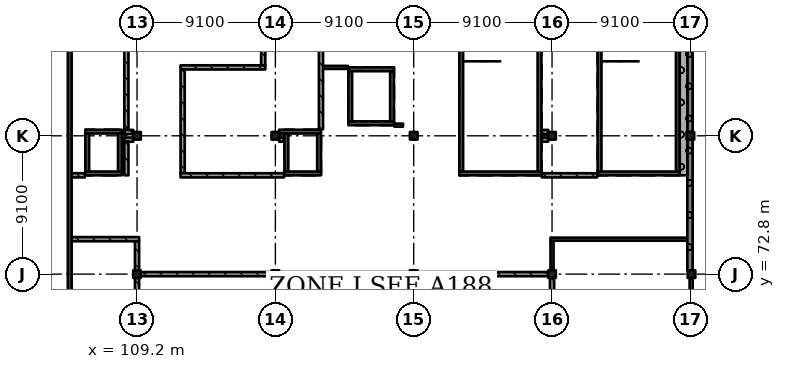
"""IFC4 building model, lengths in metres.
Left out: names, types, materials, properties, quantities, classifications, styles, units other than length and angle.
Written with IfcOpenShell. Run it as: python <this file> out.ifc"""

import sys

from ifc_helpers import new_model, si_unit, direction, frame, frame_2d, origin, origin_2d, place, context, subcontext, project, spatial, rectangle, extrude, element, fill, save


model = new_model("IFC4")
c1 = context("Model", 3, precision=1e-05, world=origin(), true_north=direction((0.0, 1.0)))
c2 = subcontext(c1, "Body", "Model", "MODEL_VIEW")
j1 = project(units=[si_unit("LENGTHUNIT", "METRE"), si_unit("PLANEANGLEUNIT", "RADIAN")], contexts=[c1])
p1 = place(None, origin())
s1 = spatial("IfcSite", under=j1, at=p1, CompositionType="ELEMENT")
p2 = place(p1, origin())
s2 = spatial("IfcBuilding", under=s1, at=p2, CompositionType="ELEMENT")
p3 = place(p2, frame((0.0, 0.0, 29.12)))
s3 = spatial("IfcBuildingStorey", under=s2, at=p3, CompositionType="ELEMENT", Elevation=29.12)
for number, where, z_axis, x_axis in (
    (1, (109.2, 72.8, 0.0), (0.0, 0.0, 1.0), (1.0, 0.0, 0.0)),
    (2, (109.2, 81.9, 0.0), (0.0, 0.0, 1.0), (1.0, 0.0, 0.0)),
    (3, (118.3, 72.8, 0.0), (0.0, 0.0, 1.0), (1.0, 0.0, 0.0)),
    (4, (118.3, 81.9, 0.0), (0.0, 0.0, 1.0), (1.0, 0.0, 0.0)),
    (5, (127.4, 72.8, 0.0), (0.0, 0.0, 1.0), (1.0, 0.0, 0.0)),
    (6, (127.4, 81.9, 0.0), (0.0, 0.0, 1.0), (1.0, 0.0, 0.0)),
    (7, (136.5, 72.8, 0.0), (0.0, 0.0, 1.0), (1.0, 0.0, 0.0)),
    (8, (136.5, 81.9, 0.0), (0.0, 0.0, 1.0), (1.0, 0.0, 0.0)),
    (9, (145.675, 72.8, 0.0), (0.0, 0.0, 1.0), (1.0, 0.0, 0.0)),
    (10, (145.6, 81.9, 0.0), (0.0, 0.0, 1.0), (1.0, 0.0, 0.0)),
):
    element("IfcColumn", number, at=place(p3, frame(where, z_axis=z_axis, x_axis=x_axis)), inside=s3, PredefinedType="COLUMN", context=c2, shape_type="SweptSolid", body=[
        extrude(rectangle(XDim=0.5, YDim=0.5, at=origin_2d()), origin(), (0.0, 0.0, 1.0), 4.55),
    ])
p4 = place(p3, frame((104.775, 68.25, 0.0), z_axis=(0.0, 0.0, 1.0), x_axis=(0.0, 1.0, 0.0)))
e11 = element("IfcWall", 11, at=p4, inside=s3, PredefinedType="SHEAR", context=c2, shape_type="SweptSolid", body=[
    extrude(rectangle(XDim=40.775, YDim=0.25, at=frame_2d((20.387, 0.0))), origin(), (0.0, 0.0, 1.0), 4.55),
])
p5 = place(p3, frame((108.2, 79.425, 0.0), z_axis=(0.0, 0.0, 1.0), x_axis=(-1.0, 0.0, 0.0)))
e12 = element("IfcWall", 12, at=p5, inside=s3, PredefinedType="SHEAR", context=c2, shape_type="SweptSolid", body=[
    extrude(rectangle(XDim=2.4, YDim=0.25, at=frame_2d((1.2, 0.0))), origin(), (0.0, 0.0, 1.0), 4.55),
])
p6 = place(p5, frame((0.75, 0.0, 0.0)))
e13 = element("IfcOpeningElement", 13, at=p6, cuts=e12, PredefinedType="OPENING", context=c2, shape_type="SweptSolid", body=[
    extrude(rectangle(XDim=0.9, YDim=2.1, at=frame_2d((0.45, 1.05))), frame((0.0, 0.135, 0.0), z_axis=(0.0, -1.0, 0.0), x_axis=(1.0, 0.0, 0.0)), (0.0, 0.0, 1.0), 0.27),
])
p7 = place(p3, frame((108.2, 82.175, 0.0), z_axis=(0.0, 0.0, 1.0), x_axis=(-1.0, 0.0, 0.0)))
e14 = element("IfcWall", 14, at=p7, inside=s3, PredefinedType="SHEAR", context=c2, shape_type="SweptSolid", body=[
    extrude(rectangle(XDim=2.4, YDim=0.25, at=frame_2d((1.2, 0.0))), origin(), (0.0, 0.0, 1.0), 4.55),
])
for number, where, z_axis, x_axis in (
    (15, (105.925, 82.05, 0.0), (0.0, 0.0, 1.0), (0.0, -1.0, 0.0)),
    (16, (108.075, 82.05, 0.0), (0.0, 0.0, 1.0), (0.0, -1.0, 0.0)),
):
    element("IfcWall", number, at=place(p3, frame(where, z_axis=z_axis, x_axis=x_axis)), inside=s3, PredefinedType="SHEAR", context=c2, shape_type="SweptSolid", body=[
        extrude(rectangle(XDim=2.5, YDim=0.25, at=frame_2d((1.25, 0.0))), origin(), (0.0, 0.0, 1.0), 4.55),
    ])
p8 = place(p3, frame((121.3, 79.425, 0.0), z_axis=(0.0, 0.0, 1.0), x_axis=(-1.0, 0.0, 0.0)))
e17 = element("IfcWall", 17, at=p8, inside=s3, PredefinedType="SHEAR", context=c2, shape_type="SweptSolid", body=[
    extrude(rectangle(XDim=2.4, YDim=0.25, at=frame_2d((1.2, 0.0))), origin(), (0.0, 0.0, 1.0), 4.55),
])
p9 = place(p3, frame((121.3, 82.175, 0.0), z_axis=(0.0, 0.0, 1.0), x_axis=(-1.0, 0.0, 0.0)))
e18 = element("IfcWall", 18, at=p9, inside=s3, PredefinedType="SHEAR", context=c2, shape_type="SweptSolid", body=[
    extrude(rectangle(XDim=2.75, YDim=0.25, at=frame_2d((1.375, 0.0))), origin(), (0.0, 0.0, 1.0), 4.55),
])
p10 = place(p3, frame((119.025, 82.05, 0.0), z_axis=(0.0, 0.0, 1.0), x_axis=(0.0, -1.0, 0.0)))
e19 = element("IfcWall", 19, at=p10, inside=s3, PredefinedType="SHEAR", context=c2, shape_type="SweptSolid", body=[
    extrude(rectangle(XDim=2.5, YDim=0.25, at=frame_2d((1.25, 0.0))), origin(), (0.0, 0.0, 1.0), 4.55),
])
p11 = place(p3, frame((121.175, 82.05, 0.0), z_axis=(0.0, 0.0, 1.0), x_axis=(0.0, -1.0, 0.0)))
e20 = element("IfcWall", 20, at=p11, inside=s3, PredefinedType="SHEAR", context=c2, shape_type="SweptSolid", body=[
    extrude(rectangle(XDim=2.5, YDim=0.25, at=frame_2d((1.25, 0.0))), origin(), (0.0, 0.0, 1.0), 4.55),
])
p12 = place(p11, frame((0.9, 0.0, 0.0)))
e21 = element("IfcOpeningElement", 21, at=p12, cuts=e20, PredefinedType="OPENING", context=c2, shape_type="SweptSolid", body=[
    extrude(rectangle(XDim=0.7, YDim=2.1, at=frame_2d((0.35, 1.05))), frame((0.0, 0.135, 0.0), z_axis=(0.0, -1.0, 0.0), x_axis=(1.0, 0.0, 0.0)), (0.0, 0.0, 1.0), 0.27),
])
p13 = place(p3, frame((126.1, 82.725, 0.0), z_axis=(0.0, 0.0, 1.0), x_axis=(-1.0, 0.0, 0.0)))
e22 = element("IfcWall", 22, at=p13, inside=s3, PredefinedType="SHEAR", context=c2, shape_type="SweptSolid", body=[
    extrude(rectangle(XDim=3.0, YDim=0.25, at=frame_2d((1.5, 0.0))), origin(), (0.0, 0.0, 1.0), 4.55),
])
p14 = place(p3, frame((126.1, 86.275, 0.0), z_axis=(0.0, 0.0, 1.0), x_axis=(-1.0, 0.0, 0.0)))
e23 = element("IfcWall", 23, at=p14, inside=s3, PredefinedType="SHEAR", context=c2, shape_type="SweptSolid", body=[
    extrude(rectangle(XDim=3.0, YDim=0.25, at=frame_2d((1.5, 0.0))), origin(), (0.0, 0.0, 1.0), 4.55),
])
p15 = place(p14, frame((0.95, 0.0, 0.0)))
e24 = element("IfcOpeningElement", 24, at=p15, cuts=e23, PredefinedType="OPENING", context=c2, shape_type="SweptSolid", body=[
    extrude(rectangle(XDim=1.1, YDim=2.1, at=frame_2d((0.55, 1.05))), frame((0.0, 0.135, 0.0), z_axis=(0.0, -1.0, 0.0), x_axis=(1.0, 0.0, 0.0)), (0.0, 0.0, 1.0), 0.27),
])
for number, where, z_axis, x_axis in (
    (25, (123.225, 86.15, 0.0), (0.0, 0.0, 1.0), (0.0, -1.0, 0.0)),
    (26, (125.975, 86.15, 0.0), (0.0, 0.0, 1.0), (0.0, -1.0, 0.0)),
):
    element("IfcWall", number, at=place(p3, frame(where, z_axis=z_axis, x_axis=x_axis)), inside=s3, PredefinedType="SHEAR", context=c2, shape_type="SweptSolid", body=[
        extrude(rectangle(XDim=3.3, YDim=0.25, at=frame_2d((1.65, 0.0))), origin(), (0.0, 0.0, 1.0), 4.55),
    ])
p16 = place(p3, frame((144.9, 79.425, 0.0), z_axis=(0.0, 0.0, 1.0), x_axis=(-1.0, 0.0, 0.0)))
e27 = element("IfcWall", 27, at=p16, inside=s3, PredefinedType="SHEAR", context=c2, shape_type="SweptSolid", body=[
    extrude(rectangle(XDim=5.4, YDim=0.25, at=frame_2d((2.7, 0.0))), origin(), (0.0, 0.0, 1.0), 4.55),
])
for number, where, z_axis, x_axis in (
    (28, (139.625, 89.15, 0.0), (0.0, 0.0, 1.0), (0.0, -1.0, 0.0)),
    (29, (144.775, 89.15, 0.0), (0.0, 0.0, 1.0), (0.0, -1.0, 0.0)),
):
    element("IfcWall", number, at=place(p3, frame(where, z_axis=z_axis, x_axis=x_axis)), inside=s3, PredefinedType="SHEAR", context=c2, shape_type="SweptSolid", body=[
        extrude(rectangle(XDim=9.6, YDim=0.25, at=frame_2d((4.8, 0.0))), origin(), (0.0, 0.0, 1.0), 4.55),
    ])
p17 = place(p3, frame((135.8, 79.425, 0.0), z_axis=(0.0, 0.0, 1.0), x_axis=(-1.0, 0.0, 0.0)))
e30 = element("IfcWall", 30, at=p17, inside=s3, PredefinedType="SHEAR", context=c2, shape_type="SweptSolid", body=[
    extrude(rectangle(XDim=5.4, YDim=0.25, at=frame_2d((2.7, 0.0))), origin(), (0.0, 0.0, 1.0), 4.55),
])
for number, where, z_axis, x_axis in (
    (31, (130.525, 89.15, 0.0), (0.0, 0.0, 1.0), (0.0, -1.0, 0.0)),
    (32, (135.675, 89.15, 0.0), (0.0, 0.0, 1.0), (0.0, -1.0, 0.0)),
):
    element("IfcWall", number, at=place(p3, frame(where, z_axis=z_axis, x_axis=x_axis)), inside=s3, PredefinedType="SHEAR", context=c2, shape_type="SweptSolid", body=[
        extrude(rectangle(XDim=9.6, YDim=0.25, at=frame_2d((4.8, 0.0))), origin(), (0.0, 0.0, 1.0), 4.55),
    ])
p18 = place(p3, frame((145.65, 68.25, 0.0), z_axis=(0.0, 0.0, 1.0), x_axis=(0.0, 1.0, 0.0)))
e33 = element("IfcWall", 33, at=p18, inside=s3, PredefinedType="SOLIDWALL", context=c2, shape_type="SweptSolid", body=[
    extrude(rectangle(XDim=4.3, YDim=0.2, at=frame_2d((2.15, 0.0))), origin(), (0.0, 0.0, 1.0), 4.5),
])
p19 = place(p18, frame((0.65, 0.0, 0.6)))
e34 = element("IfcOpeningElement", 34, at=p19, cuts=e33, PredefinedType="OPENING", context=c2, shape_type="SweptSolid", body=[
    extrude(rectangle(XDim=3.0, YDim=3.0, at=frame_2d((1.5, 1.5))), frame((0.0, 0.11, 0.0), z_axis=(0.0, -1.0, 0.0), x_axis=(1.0, 0.0, 0.0)), (0.0, 0.0, 1.0), 0.22),
])
p20 = place(p3, frame((145.575, 73.05, 0.0), z_axis=(0.0, 0.0, 1.0), x_axis=(0.0, 1.0, 0.0)))
e35 = element("IfcWall", 35, at=p20, inside=s3, PredefinedType="SOLIDWALL", context=c2, shape_type="SweptSolid", body=[
    extrude(rectangle(XDim=8.6, YDim=0.35, at=frame_2d((4.3, 0.0))), origin(), (0.0, 0.0, 1.0), 4.5),
])
p21 = place(p3, frame((145.575, 82.15, 0.0), z_axis=(0.0, 0.0, 1.0), x_axis=(0.0, 1.0, 0.0)))
e36 = element("IfcWall", 36, at=p21, inside=s3, PredefinedType="SOLIDWALL", context=c2, shape_type="SweptSolid", body=[
    extrude(rectangle(XDim=8.6, YDim=0.35, at=frame_2d((4.3, 0.0))), origin(), (0.0, 0.0, 1.0), 4.5),
])
p22 = place(p3, frame((145.15, 79.3, 0.0), z_axis=(0.0, 0.0, 1.0), x_axis=(0.0, 1.0, 0.0)))
e37 = element("IfcWall", 37, at=p22, inside=s3, PredefinedType="SOLIDWALL", context=c2, shape_type="SweptSolid", body=[
    extrude(rectangle(XDim=10.1, YDim=0.5, at=frame_2d((5.05, 0.0))), origin(), (0.0, 0.0, 1.0), 4.55),
])
p23 = place(p3, frame((104.9, 75.1, 0.0), z_axis=(0.0, 0.0, 1.0), x_axis=(1.0, 0.0, 0.0)))
e38 = element("IfcWall", 38, at=p23, inside=s3, PredefinedType="SOLIDWALL", context=c2, shape_type="SweptSolid", body=[
    extrude(rectangle(XDim=4.438, YDim=0.275, at=frame_2d((2.219, 0.0))), origin(), (0.0, 0.0, 1.0), 3.88),
])
p24 = place(p23, frame((1.65, 0.0, 0.0)))
e39 = element("IfcOpeningElement", 39, at=p24, cuts=e38, PredefinedType="OPENING", context=c2, shape_type="SweptSolid", body=[
    extrude(rectangle(XDim=1.2, YDim=2.4, at=frame_2d((0.6, 1.2))), frame((0.0, 0.147, 0.0), z_axis=(0.0, -1.0, 0.0), x_axis=(1.0, 0.0, 0.0)), (0.0, 0.0, 1.0), 0.295),
])
p25 = place(p3, frame((105.77, 79.3, 0.0), z_axis=(0.0, 0.0, 1.0), x_axis=(-1.0, 0.0, 0.0)))
e40 = element("IfcWall", 40, at=p25, inside=s3, PredefinedType="SOLIDWALL", context=c2, shape_type="SweptSolid", body=[
    extrude(rectangle(XDim=0.87, YDim=0.275, at=frame_2d((0.435, 0.0))), origin(), (0.0, 0.0, 1.0), 3.88),
])
p26 = place(p3, frame((108.363, 81.65, 0.0), z_axis=(0.0, 0.0, 1.0), x_axis=(1.0, 0.0, 0.0)))
e41 = element("IfcWall", 41, at=p26, inside=s3, PredefinedType="SOLIDWALL", context=c2, shape_type="SweptSolid", body=[
    extrude(rectangle(XDim=0.587, YDim=0.275, at=frame_2d((0.294, 0.0))), origin(), (0.0, 0.0, 1.0), 3.88),
])
p27 = place(p3, frame((108.5, 79.3, 0.0), z_axis=(0.0, 0.0, 1.0), x_axis=(0.0, 1.0, 0.0)))
e42 = element("IfcWall", 42, at=p27, inside=s3, PredefinedType="SOLIDWALL", context=c2, shape_type="SweptSolid", body=[
    extrude(rectangle(XDim=2.212, YDim=0.275, at=frame_2d((1.106, 0.0))), origin(), (0.0, 0.0, 1.0), 3.88),
])
p28 = place(p3, frame((108.5, 82.288, 0.0), z_axis=(0.0, 0.0, 1.0), x_axis=(0.0, 1.0, 0.0)))
e43 = element("IfcWall", 43, at=p28, inside=s3, PredefinedType="SOLIDWALL", context=c2, shape_type="SweptSolid", body=[
    extrude(rectangle(XDim=6.975, YDim=0.275, at=frame_2d((3.487, 0.0))), origin(), (0.0, 0.0, 1.0), 3.88),
])
p29 = place(p3, frame((108.95, 82.15, 0.0), z_axis=(0.0, 0.0, 1.0), x_axis=(-1.0, 0.0, 0.0)))
e44 = element("IfcWall", 44, at=p29, inside=s3, PredefinedType="SOLIDWALL", context=c2, shape_type="SweptSolid", body=[
    extrude(rectangle(XDim=0.587, YDim=0.275, at=frame_2d((0.294, 0.0))), origin(), (0.0, 0.0, 1.0), 3.88),
])
p30 = place(p3, frame((109.2, 68.5, 0.0), z_axis=(0.0, 0.0, 1.0), x_axis=(0.0, 1.0, 0.0)))
e45 = element("IfcWall", 45, at=p30, inside=s3, PredefinedType="SOLIDWALL", context=c2, shape_type="SweptSolid", body=[
    extrude(rectangle(XDim=4.05, YDim=0.275, at=frame_2d((2.025, 0.0))), origin(), (0.0, 0.0, 1.0), 3.88),
])
p31 = place(p3, frame((109.2, 74.962, 0.0), z_axis=(0.0, 0.0, 1.0), x_axis=(0.0, -1.0, 0.0)))
e46 = element("IfcWall", 46, at=p31, inside=s3, PredefinedType="SOLIDWALL", context=c2, shape_type="SweptSolid", body=[
    extrude(rectangle(XDim=1.912, YDim=0.275, at=frame_2d((0.956, 0.0))), origin(), (0.0, 0.0, 1.0), 3.88),
])
p32 = place(p3, frame((109.45, 72.8, 0.0), z_axis=(0.0, 0.0, 1.0), x_axis=(1.0, 0.0, 0.0)))
e47 = element("IfcWall", 47, at=p32, inside=s3, PredefinedType="SOLIDWALL", context=c2, shape_type="SweptSolid", body=[
    extrude(rectangle(XDim=8.6, YDim=0.275, at=frame_2d((4.3, 0.0))), origin(), (0.0, 0.0, 1.0), 3.88),
])
p33 = place(p32, frame((3.65, 0.0, 0.0)))
e48 = element("IfcOpeningElement", 48, at=p33, cuts=e47, PredefinedType="OPENING", context=c2, shape_type="SweptSolid", body=[
    extrude(rectangle(XDim=1.2, YDim=2.4, at=frame_2d((0.6, 1.2))), frame((0.0, 0.147, 0.0), z_axis=(0.0, -1.0, 0.0), x_axis=(1.0, 0.0, 0.0)), (0.0, 0.0, 1.0), 0.295),
])
p34 = place(p3, frame((112.062, 86.4, 0.0), z_axis=(0.0, 0.0, 1.0), x_axis=(1.0, 0.0, 0.0)))
e49 = element("IfcWall", 49, at=p34, inside=s3, PredefinedType="SOLIDWALL", context=c2, shape_type="SweptSolid", body=[
    extrude(rectangle(XDim=5.575, YDim=0.275, at=frame_2d((2.788, 0.0))), origin(), (0.0, 0.0, 1.0), 3.88),
])
p35 = place(p3, frame((112.2, 79.438, 0.0), z_axis=(0.0, 0.0, 1.0), x_axis=(0.0, 1.0, 0.0)))
e50 = element("IfcWall", 50, at=p35, inside=s3, PredefinedType="SOLIDWALL", context=c2, shape_type="SweptSolid", body=[
    extrude(rectangle(XDim=6.825, YDim=0.275, at=frame_2d((3.413, 0.0))), origin(), (0.0, 0.0, 1.0), 3.88),
])
p36 = place(p3, frame((112.062, 79.3, 0.0), z_axis=(0.0, 0.0, 1.0), x_axis=(1.0, 0.0, 0.0)))
e51 = element("IfcWall", 51, at=p36, inside=s3, PredefinedType="SOLIDWALL", context=c2, shape_type="SweptSolid", body=[
    extrude(rectangle(XDim=6.808, YDim=0.275, at=frame_2d((3.404, 0.0))), origin(), (0.0, 0.0, 1.0), 3.88),
])
p37 = place(p3, frame((117.5, 86.538, 0.0), z_axis=(0.0, 0.0, 1.0), x_axis=(0.0, 1.0, 0.0)))
e52 = element("IfcWall", 52, at=p37, inside=s3, PredefinedType="SOLIDWALL", context=c2, shape_type="SweptSolid", body=[
    extrude(rectangle(XDim=2.725, YDim=0.275, at=frame_2d((1.362, 0.0))), origin(), (0.0, 0.0, 1.0), 3.88),
])
p38 = place(p3, frame((118.55, 72.8, 0.0), z_axis=(0.0, 0.0, 1.0), x_axis=(1.0, 0.0, 0.0)))
e53 = element("IfcWall", 53, at=p38, inside=s3, PredefinedType="SOLIDWALL", context=c2, shape_type="SweptSolid", body=[
    extrude(rectangle(XDim=8.6, YDim=0.275, at=frame_2d((4.3, 0.0))), origin(), (0.0, 0.0, 1.0), 3.88),
])
p39 = place(p3, frame((118.55, 81.65, 0.0), z_axis=(0.0, 0.0, 1.0), x_axis=(1.0, 0.0, 0.0)))
e54 = element("IfcWall", 54, at=p39, inside=s3, PredefinedType="SOLIDWALL", context=c2, shape_type="SweptSolid", body=[
    extrude(rectangle(XDim=0.32, YDim=0.275, at=frame_2d((0.16, 0.0))), origin(), (0.0, 0.0, 1.0), 3.88),
])
p40 = place(p3, frame((121.3, 82.33, 0.0), z_axis=(0.0, 0.0, 1.0), x_axis=(0.0, 1.0, 0.0)))
e55 = element("IfcWall", 55, at=p40, inside=s3, PredefinedType="SOLIDWALL", context=c2, shape_type="SweptSolid", body=[
    extrude(rectangle(XDim=6.932, YDim=0.275, at=frame_2d((3.466, 0.0))), origin(), (0.0, 0.0, 1.0), 3.88),
])
p41 = place(p3, frame((122.85, 68.5, 0.0), z_axis=(0.0, 0.0, 1.0), x_axis=(0.0, 1.0, 0.0)))
e56 = element("IfcWall", 56, at=p41, inside=s3, PredefinedType="SOLIDWALL", context=c2, shape_type="SweptSolid", body=[
    extrude(rectangle(XDim=4.163, YDim=0.275, at=frame_2d((2.081, 0.0))), origin(), (0.0, 0.0, 1.0), 3.88),
])
p42 = place(p3, frame((123.07, 86.4, 0.0), z_axis=(0.0, 0.0, 1.0), x_axis=(-1.0, 0.0, 0.0)))
e57 = element("IfcWall", 57, at=p42, inside=s3, PredefinedType="PARTITIONING", context=c2, shape_type="SweptSolid", body=[
    extrude(rectangle(XDim=1.633, YDim=0.2, at=frame_2d((0.816, 0.0))), origin(), (0.0, 0.0, 1.0), 3.88),
])
p43 = place(p3, frame((126.7, 82.6, 0.0), z_axis=(0.0, 0.0, 1.0), x_axis=(-1.0, 0.0, 0.0)))
e58 = element("IfcWall", 58, at=p43, inside=s3, PredefinedType="PARTITIONING", context=c2, shape_type="SweptSolid", body=[
    extrude(rectangle(XDim=0.57, YDim=0.2, at=frame_2d((0.285, 0.0))), origin(), (0.0, 0.0, 1.0), 3.88),
])
p44 = place(p3, frame((127.65, 72.8, 0.0), z_axis=(0.0, 0.0, 1.0), x_axis=(1.0, 0.0, 0.0)))
e59 = element("IfcWall", 59, at=p44, inside=s3, PredefinedType="SOLIDWALL", context=c2, shape_type="SweptSolid", body=[
    extrude(rectangle(XDim=8.6, YDim=0.275, at=frame_2d((4.3, 0.0))), origin(), (0.0, 0.0, 1.0), 3.88),
])
p45 = place(p44, frame((3.65, 0.0, 0.0)))
e60 = element("IfcOpeningElement", 60, at=p45, cuts=e59, PredefinedType="OPENING", context=c2, shape_type="SweptSolid", body=[
    extrude(rectangle(XDim=1.2, YDim=2.4, at=frame_2d((0.6, 1.2))), frame((0.0, 0.147, 0.0), z_axis=(0.0, -1.0, 0.0), x_axis=(1.0, 0.0, 0.0)), (0.0, 0.0, 1.0), 0.295),
])
for number, where, z_axis, x_axis in (
    (61, (135.83, 81.65, 0.0), (0.0, 0.0, 1.0), (1.0, 0.0, 0.0)),
    (62, (136.25, 82.15, 0.0), (0.0, 0.0, 1.0), (-1.0, 0.0, 0.0)),
):
    element("IfcWall", number, at=place(p3, frame(where, z_axis=z_axis, x_axis=x_axis)), inside=s3, PredefinedType="SOLIDWALL", context=c2, shape_type="SweptSolid", body=[
        extrude(rectangle(XDim=0.42, YDim=0.275, at=frame_2d((0.21, 0.0))), origin(), (0.0, 0.0, 1.0), 3.88),
    ])
p46 = place(p3, frame((136.5, 72.55, 0.0), z_axis=(0.0, 0.0, 1.0), x_axis=(0.0, -1.0, 0.0)))
e63 = element("IfcWall", 63, at=p46, inside=s3, PredefinedType="SOLIDWALL", context=c2, shape_type="SweptSolid", body=[
    extrude(rectangle(XDim=4.05, YDim=0.275, at=frame_2d((2.025, 0.0))), origin(), (0.0, 0.0, 1.0), 3.88),
])
p47 = place(p3, frame((136.5, 75.0, 0.0), z_axis=(0.0, 0.0, 1.0), x_axis=(0.0, -1.0, 0.0)))
e64 = element("IfcWall", 64, at=p47, inside=s3, PredefinedType="PARTITIONING", context=c2, shape_type="SweptSolid", body=[
    extrude(rectangle(XDim=1.95, YDim=0.2, at=frame_2d((0.975, 0.0))), origin(), (0.0, 0.0, 1.0), 3.88),
])
p48 = place(p3, frame((139.47, 79.3, 0.0), z_axis=(0.0, 0.0, 1.0), x_axis=(-1.0, 0.0, 0.0)))
e65 = element("IfcWall", 65, at=p48, inside=s3, PredefinedType="SOLIDWALL", context=c2, shape_type="SweptSolid", body=[
    extrude(rectangle(XDim=3.64, YDim=0.275, at=frame_2d((1.82, 0.0))), origin(), (0.0, 0.0, 1.0), 3.88),
])
p49 = place(p3, frame((145.4, 75.1, 0.0), z_axis=(0.0, 0.0, 1.0), x_axis=(-1.0, 0.0, 0.0)))
e66 = element("IfcWall", 66, at=p49, inside=s3, PredefinedType="PARTITIONING", context=c2, shape_type="SweptSolid", body=[
    extrude(rectangle(XDim=9.0, YDim=0.2, at=frame_2d((4.5, 0.0))), origin(), (0.0, 0.0, 1.0), 3.88),
])
p50 = place(p49, frame((1.05, 0.0, 0.0)))
e67 = element("IfcOpeningElement", 67, at=p50, cuts=e66, PredefinedType="OPENING", context=c2, shape_type="SweptSolid", body=[
    extrude(rectangle(XDim=2.4, YDim=2.4, at=frame_2d((1.2, 1.2))), frame((0.0, 0.11, 0.0), z_axis=(0.0, -1.0, 0.0), x_axis=(1.0, 0.0, 0.0)), (0.0, 0.0, 1.0), 0.22),
])
p51 = place(p49, frame((5.55, 0.0, 0.0)))
e68 = element("IfcOpeningElement", 68, at=p51, cuts=e66, PredefinedType="OPENING", context=c2, shape_type="SweptSolid", body=[
    extrude(rectangle(XDim=2.4, YDim=2.4, at=frame_2d((1.2, 1.2))), frame((0.0, 0.11, 0.0), z_axis=(0.0, -1.0, 0.0), x_axis=(1.0, 0.0, 0.0)), (0.0, 0.0, 1.0), 0.22),
])
p52 = place(p19, origin())
e69 = element("IfcWindow", 69, at=p52, inside=s3, PartitioningType="SINGLE_PANEL", PredefinedType="WINDOW", context=c2, shape_type="SweptSolid", body=[
    extrude(rectangle(XDim=3.0, YDim=3.0, at=frame_2d((1.5, 1.5))), frame((0.0, 0.03, 0.0), z_axis=(0.0, -1.0, 0.0), x_axis=(1.0, 0.0, 0.0)), (0.0, 0.0, 1.0), 0.06),
])
fill(e34, e69)
p53 = place(p45, origin())
e70 = element("IfcDoor", 70, at=p53, inside=s3, OperationType="SINGLE_SWING_LEFT", PredefinedType="DOOR", context=c2, shape_type="SweptSolid", body=[
    extrude(rectangle(XDim=1.2, YDim=2.4, at=frame_2d((0.6, 1.2))), frame((0.0, 0.025, 0.0), z_axis=(0.0, -1.0, 0.0), x_axis=(1.0, 0.0, 0.0)), (0.0, 0.0, 1.0), 0.05),
])
fill(e60, e70)
p54 = place(p33, origin())
e71 = element("IfcDoor", 71, at=p54, inside=s3, OperationType="SINGLE_SWING_LEFT", PredefinedType="DOOR", context=c2, shape_type="SweptSolid", body=[
    extrude(rectangle(XDim=1.2, YDim=2.4, at=frame_2d((0.6, 1.2))), frame((0.0, 0.025, 0.0), z_axis=(0.0, -1.0, 0.0), x_axis=(1.0, 0.0, 0.0)), (0.0, 0.0, 1.0), 0.05),
])
fill(e48, e71)
p55 = place(p24, origin())
e72 = element("IfcDoor", 72, at=p55, inside=s3, OperationType="SINGLE_SWING_RIGHT", PredefinedType="DOOR", context=c2, shape_type="SweptSolid", body=[
    extrude(rectangle(XDim=1.2, YDim=2.4, at=frame_2d((0.6, 1.2))), frame((0.0, 0.025, 0.0), z_axis=(0.0, -1.0, 0.0), x_axis=(1.0, 0.0, 0.0)), (0.0, 0.0, 1.0), 0.05),
])
fill(e39, e72)
p56 = place(p50, origin())
e73 = element("IfcDoor", 73, at=p56, inside=s3, OperationType="DOUBLE_DOOR_SINGLE_SWING", PredefinedType="DOOR", context=c2, shape_type="SweptSolid", body=[
    extrude(rectangle(XDim=2.4, YDim=2.4, at=frame_2d((1.2, 1.2))), frame((0.0, 0.025, 0.0), z_axis=(0.0, -1.0, 0.0), x_axis=(1.0, 0.0, 0.0)), (0.0, 0.0, 1.0), 0.05),
])
fill(e67, e73)
p57 = place(p51, origin())
e74 = element("IfcDoor", 74, at=p57, inside=s3, OperationType="DOUBLE_DOOR_SINGLE_SWING", PredefinedType="DOOR", context=c2, shape_type="SweptSolid", body=[
    extrude(rectangle(XDim=2.4, YDim=2.4, at=frame_2d((1.2, 1.2))), frame((0.0, 0.025, 0.0), z_axis=(0.0, -1.0, 0.0), x_axis=(1.0, 0.0, 0.0)), (0.0, 0.0, 1.0), 0.05),
])
fill(e68, e74)
p58 = place(p6, origin())
e75 = element("IfcDoor", 75, at=p58, inside=s3, OperationType="SINGLE_SWING_LEFT", PredefinedType="DOOR", context=c2, shape_type="SweptSolid", body=[
    extrude(rectangle(XDim=0.9, YDim=2.1, at=frame_2d((0.45, 1.05))), frame((0.0, 0.025, 0.0), z_axis=(0.0, -1.0, 0.0), x_axis=(1.0, 0.0, 0.0)), (0.0, 0.0, 1.0), 0.05),
])
fill(e13, e75)
p59 = place(p12, origin())
e76 = element("IfcDoor", 76, at=p59, inside=s3, OperationType="SINGLE_SWING_RIGHT", PredefinedType="DOOR", context=c2, shape_type="SweptSolid", body=[
    extrude(rectangle(XDim=0.7, YDim=2.1, at=frame_2d((0.35, 1.05))), frame((0.0, 0.025, 0.0), z_axis=(0.0, -1.0, 0.0), x_axis=(1.0, 0.0, 0.0)), (0.0, 0.0, 1.0), 0.05),
])
fill(e21, e76)
p60 = place(p15, origin())
e77 = element("IfcDoor", 77, at=p60, inside=s3, OperationType="DOUBLE_DOOR_SLIDING", PredefinedType="DOOR", context=c2, shape_type="SweptSolid", body=[
    extrude(rectangle(XDim=1.1, YDim=2.1, at=frame_2d((0.55, 1.05))), frame((0.0, 0.025, 0.0), z_axis=(0.0, -1.0, 0.0), x_axis=(1.0, 0.0, 0.0)), (0.0, 0.0, 1.0), 0.05),
])
fill(e24, e77)
save(model, sys.argv[1])
